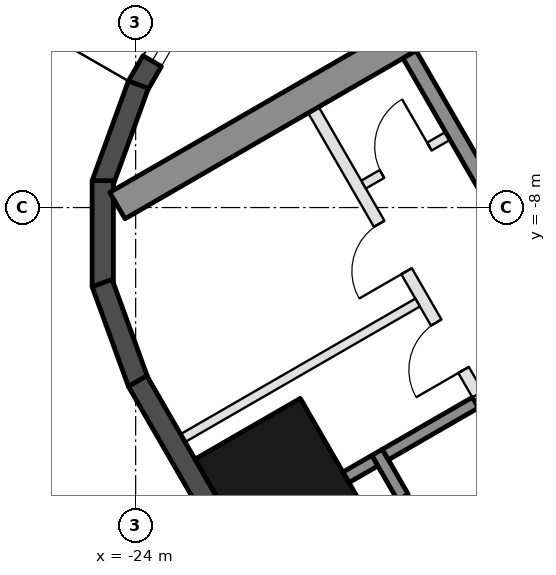
"""IFC4 building model, lengths in metres.
Left out: names, types, materials, properties, quantities, classifications, styles, units other than length and angle.
Written with IfcOpenShell. Run it as: python <this file> out.ifc"""

import sys

from ifc_helpers import new_model, si_unit, direction, frame, frame_2d, origin, origin_2d, place, context, subcontext, project, spatial, rectangle, hollow_rectangle, extrude, boolean, halfspace, element, fill, save


model = new_model("IFC4")
c1 = context("Model", 3, precision=1e-05, world=origin(), true_north=direction((0.0, 1.0)))
c2 = subcontext(c1, "Body", "Model", "MODEL_VIEW")
j1 = project(units=[si_unit("LENGTHUNIT", "METRE"), si_unit("PLANEANGLEUNIT", "RADIAN")], contexts=[c1])
p1 = place(None, origin())
s1 = spatial("IfcSite", under=j1, at=p1, CompositionType="ELEMENT")
p2 = place(p1, origin())
s2 = spatial("IfcBuilding", under=s1, at=p2, CompositionType="ELEMENT")
p3 = place(p2, frame((0.0, 0.0, 280.0)))
s3 = spatial("IfcBuildingStorey", under=s2, at=p3, CompositionType="ELEMENT", Elevation=280.0)
p4 = place(p3, frame((-21.658, -12.504, 0.0), z_axis=(0.0, 0.0, 1.0), x_axis=(-0.5, 0.866025403784, 0.0)))
e1 = element("IfcColumn", 1, at=p4, inside=s3, PredefinedType="COLUMN", context=c2, shape_type="SweptSolid", body=[
    boolean("DIFFERENCE", extrude(hollow_rectangle(XDim=2.0, YDim=2.0, WallThickness=0.05, at=origin_2d()), origin(), (0.0, 0.0, 1.0), 3.7), halfspace(frame((0.0, 0.0, 0.113), z_axis=(0.0, 0.0, 1.0), x_axis=(1.0, 0.0, 0.0)), True)),
])
p5 = place(p3, frame((-22.14, -2.841, 0.0), z_axis=(0.0, 0.0, 1.0), x_axis=(-0.500040506767, -0.866002015928, 0.0)))
e2 = element("IfcWall", 2, at=p5, inside=s3, PredefinedType="SOLIDWALL", context=c2, shape_type="SweptSolid", body=[
    extrude(rectangle(XDim=3.655, YDim=0.35, at=frame_2d((1.827, 0.0))), origin(), (0.0, 0.0, 1.0), 3.55),
])
p6 = place(p5, frame((1.575, 0.0, 0.3)))
e3 = element("IfcOpeningElement", 3, at=p6, cuts=e2, PredefinedType="OPENING", context=c2, shape_type="SweptSolid", body=[
    extrude(rectangle(XDim=1.6, YDim=2.65, at=frame_2d((0.8, 1.325))), frame((0.0, 0.185, 0.0), z_axis=(0.0, -1.0, 0.0), x_axis=(1.0, 0.0, 0.0)), (0.0, 0.0, 1.0), 0.37),
])
for number, where, z_axis, x_axis in (
    (4, (-23.955, -5.978, 0.0), (0.0, 0.0, 1.0), (-0.342, -0.94, 0.0)),
    (5, (-24.541, -7.558, 0.0), (0.0, 0.0, 1.0), (0.0, -1.0, 0.0)),
    (6, (-24.552, -9.242, 0.0), (0.0, 0.0, 1.0), (0.342, -0.94, 0.0)),
):
    element("IfcWall", number, at=place(p3, frame(where, z_axis=z_axis, x_axis=x_axis)), inside=s3, PredefinedType="SOLIDWALL", context=c2, shape_type="SweptSolid", body=[
        extrude(rectangle(XDim=1.745, YDim=0.35, at=frame_2d((0.872, 0.0))), origin(), (0.0, 0.0, 1.0), 3.55),
    ])
p7 = place(p3, frame((-23.968, -10.854, 0.0), z_axis=(0.0, 0.0, 1.0), x_axis=(0.500020983425, -0.866013288659, 0.0)))
e7 = element("IfcWall", 7, at=p7, inside=s3, PredefinedType="SOLIDWALL", context=c2, shape_type="SweptSolid", body=[
    extrude(rectangle(XDim=5.168, YDim=0.35, at=frame_2d((2.584, 0.0))), origin(), (0.0, 0.0, 1.0), 3.55),
])
for number, where, z_axis, x_axis in (
    (8, (-13.797, -1.903, 0.0), (0.0, 0.0, 1.0), (-0.866, -0.5, 0.0)),
    (9, (-8.547, -10.997, 0.0), (0.0, 0.0, 1.0), (-0.866, -0.5, 0.0)),
):
    element("IfcWall", number, at=place(p3, frame(where, z_axis=z_axis, x_axis=x_axis)), inside=s3, PredefinedType="SHEAR", context=c2, shape_type="SweptSolid", body=[
        extrude(rectangle(XDim=12.129, YDim=0.5, at=frame_2d((6.064, 0.0))), origin(), (0.0, 0.0, 1.0), 3.5),
    ])
p8 = place(p3, frame((-19.496, -5.482, 0.0), z_axis=(0.0, 0.0, 1.0), x_axis=(0.499990435942, -0.866030925526, 0.0)))
e10 = element("IfcWall", 10, at=p8, inside=s3, PredefinedType="SHEAR", context=c2, shape_type="SweptSolid", body=[
    extrude(rectangle(XDim=2.55, YDim=0.25, at=frame_2d((1.275, 0.0))), origin(), (0.0, 0.0, 1.0), 3.5),
])
p9 = place(p3, frame((-10.068, -9.162, 0.0), z_axis=(0.0, 0.0, 1.0), x_axis=(-0.866032725843, -0.499987317609, 0.0)))
e11 = element("IfcWall", 11, at=p9, inside=s3, PredefinedType="SHEAR", context=c2, shape_type="SweptSolid", body=[
    extrude(rectangle(XDim=10.16, YDim=0.2, at=frame_2d((5.08, 0.0))), origin(), (0.0, 0.0, 1.0), 3.5),
])
p10 = place(p9, frame((1.99, 0.0, 0.0)))
e12 = element("IfcOpeningElement", 12, at=p10, cuts=e11, PredefinedType="OPENING", context=c2, shape_type="SweptSolid", body=[
    extrude(rectangle(XDim=0.9, YDim=2.1, at=frame_2d((0.45, 1.05))), frame((0.0, 0.11, 0.0), z_axis=(0.0, -1.0, 0.0), x_axis=(1.0, 0.0, 0.0)), (0.0, 0.0, 1.0), 0.22),
])
p11 = place(p9, frame((7.07, 0.0, 0.0)))
e13 = element("IfcOpeningElement", 13, at=p11, cuts=e11, PredefinedType="OPENING", context=c2, shape_type="SweptSolid", body=[
    extrude(rectangle(XDim=0.9, YDim=2.1, at=frame_2d((0.45, 1.05))), frame((0.0, 0.11, 0.0), z_axis=(0.0, -1.0, 0.0), x_axis=(1.0, 0.0, 0.0)), (0.0, 0.0, 1.0), 0.22),
])
p12 = place(p3, frame((-20.031, -12.026, 0.0), z_axis=(0.0, 0.0, 1.0), x_axis=(0.500033551112, -0.866006032174, 0.0)))
e14 = element("IfcWall", 14, at=p12, inside=s3, PredefinedType="SHEAR", context=c2, shape_type="SweptSolid", body=[
    extrude(rectangle(XDim=2.4, YDim=0.2, at=frame_2d((1.2, 0.0))), origin(), (0.0, 0.0, 1.0), 3.5),
])
p13 = place(p12, frame((0.85, 0.0, 0.0)))
e15 = element("IfcOpeningElement", 15, at=p13, cuts=e14, PredefinedType="OPENING", context=c2, shape_type="SweptSolid", body=[
    extrude(rectangle(XDim=0.9, YDim=2.1, at=frame_2d((0.45, 1.05))), frame((0.0, 0.11, 0.0), z_axis=(0.0, -1.0, 0.0), x_axis=(1.0, 0.0, 0.0)), (0.0, 0.0, 1.0), 0.22),
])
p14 = place(p3, frame((-18.413, -11.208, 0.0), z_axis=(0.0, 0.0, 1.0), x_axis=(-0.866038183914, -0.499977863513, 0.0)))
e16 = element("IfcWall", 16, at=p14, inside=s3, PredefinedType="SHEAR", context=c2, shape_type="SweptSolid", body=[
    extrude(rectangle(XDim=1.71, YDim=0.2, at=frame_2d((0.855, 0.0))), origin(), (0.0, 0.0, 1.0), 3.5),
])
p15 = place(p3, frame((-20.067, -12.163, 0.0), z_axis=(0.0, 0.0, 1.0), x_axis=(-0.866044851585, -0.499966313909, 0.0)))
e17 = element("IfcWall", 17, at=p15, inside=s3, PredefinedType="SHEAR", context=c2, shape_type="SweptSolid", body=[
    extrude(rectangle(XDim=0.549, YDim=0.2, at=frame_2d((0.274, 0.0))), origin(), (0.0, 0.0, 1.0), 3.5),
])
p16 = place(p3, frame((-21.076, -6.395, 0.0), z_axis=(0.0, 0.0, 1.0), x_axis=(0.50001468107, -0.866016927499, 0.0)))
e18 = element("IfcWall", 18, at=p16, inside=s3, PredefinedType="PARTITIONING", context=c2, shape_type="SweptSolid", body=[
    extrude(rectangle(XDim=5.4, YDim=0.2, at=frame_2d((2.7, 0.0))), origin(), (0.0, 0.0, 1.0), 3.5),
])
p17 = place(p16, frame((2.163, 0.0, 0.0)))
e19 = element("IfcOpeningElement", 19, at=p17, cuts=e18, PredefinedType="OPENING", context=c2, shape_type="SweptSolid", body=[
    extrude(rectangle(XDim=0.9, YDim=2.1, at=frame_2d((0.45, 1.05))), frame((0.0, 0.11, 0.0), z_axis=(0.0, -1.0, 0.0), x_axis=(1.0, 0.0, 0.0)), (0.0, 0.0, 1.0), 0.22),
])
p18 = place(p16, frame((4.038, 0.0, 0.0)))
e20 = element("IfcOpeningElement", 20, at=p18, cuts=e18, PredefinedType="OPENING", context=c2, shape_type="SweptSolid", body=[
    extrude(rectangle(XDim=0.9, YDim=2.1, at=frame_2d((0.45, 1.05))), frame((0.0, 0.11, 0.0), z_axis=(0.0, -1.0, 0.0), x_axis=(1.0, 0.0, 0.0)), (0.0, 0.0, 1.0), 0.22),
])
p19 = place(p3, frame((-18.866, -6.822, 0.0), z_axis=(0.0, 0.0, 1.0), x_axis=(-0.866028054938, -0.499995408039, 0.0)))
e21 = element("IfcWall", 21, at=p19, inside=s3, PredefinedType="PARTITIONING", context=c2, shape_type="SweptSolid", body=[
    extrude(rectangle(XDim=1.6, YDim=0.15, at=frame_2d((0.8, 0.0))), origin(), (0.0, 0.0, 1.0), 3.5),
])
p20 = place(p19, frame((0.35, 0.0, 0.0)))
e22 = element("IfcOpeningElement", 22, at=p20, cuts=e21, PredefinedType="OPENING", context=c2, shape_type="SweptSolid", body=[
    extrude(rectangle(XDim=0.9, YDim=2.1, at=frame_2d((0.45, 1.05))), frame((0.0, 0.085, 0.0), z_axis=(0.0, -1.0, 0.0), x_axis=(1.0, 0.0, 0.0)), (0.0, 0.0, 1.0), 0.17),
])
p21 = place(p3, frame((-19.363, -9.562, 0.0), z_axis=(0.0, 0.0, 1.0), x_axis=(-0.866024199568, -0.500002085759, 0.0)))
e23 = element("IfcWall", 23, at=p21, inside=s3, PredefinedType="PARTITIONING", context=c2, shape_type="SweptSolid", body=[
    extrude(rectangle(XDim=4.459, YDim=0.15, at=frame_2d((2.229, 0.0))), origin(), (0.0, 0.0, 1.0), 3.5),
])
p22 = place(p6, origin())
e24 = element("IfcWindow", 24, at=p22, inside=s3, PartitioningType="SINGLE_PANEL", PredefinedType="WINDOW", context=c2, shape_type="SweptSolid", body=[
    extrude(rectangle(XDim=1.6, YDim=2.65, at=frame_2d((0.8, 1.325))), frame((0.0, 0.03, 0.0), z_axis=(0.0, -1.0, 0.0), x_axis=(1.0, 0.0, 0.0)), (0.0, 0.0, 1.0), 0.06),
])
fill(e3, e24)
p23 = place(p20, frame((0.9, 0.0, 0.0), z_axis=(0.0, 0.0, 1.0), x_axis=(-1.0, 0.0, 0.0)))
e25 = element("IfcDoor", 25, at=p23, inside=s3, OperationType="SINGLE_SWING_RIGHT", PredefinedType="DOOR", context=c2, shape_type="SweptSolid", body=[
    extrude(rectangle(XDim=0.9, YDim=2.1, at=frame_2d((0.45, 1.05))), frame((0.0, 0.025, 0.0), z_axis=(0.0, -1.0, 0.0), x_axis=(1.0, 0.0, 0.0)), (0.0, 0.0, 1.0), 0.05),
])
fill(e22, e25)
p24 = place(p17, frame((0.9, 0.0, 0.0), z_axis=(0.0, 0.0, 1.0), x_axis=(-1.0, 0.0, 0.0)))
e26 = element("IfcDoor", 26, at=p24, inside=s3, OperationType="SINGLE_SWING_LEFT", PredefinedType="DOOR", context=c2, shape_type="SweptSolid", body=[
    extrude(rectangle(XDim=0.9, YDim=2.1, at=frame_2d((0.45, 1.05))), frame((0.0, 0.025, 0.0), z_axis=(0.0, -1.0, 0.0), x_axis=(1.0, 0.0, 0.0)), (0.0, 0.0, 1.0), 0.05),
])
fill(e19, e26)
p25 = place(p18, frame((0.9, 0.0, 0.0), z_axis=(0.0, 0.0, 1.0), x_axis=(-1.0, 0.0, 0.0)))
e27 = element("IfcDoor", 27, at=p25, inside=s3, OperationType="SINGLE_SWING_LEFT", PredefinedType="DOOR", context=c2, shape_type="SweptSolid", body=[
    extrude(rectangle(XDim=0.9, YDim=2.1, at=frame_2d((0.45, 1.05))), frame((0.0, 0.025, 0.0), z_axis=(0.0, -1.0, 0.0), x_axis=(1.0, 0.0, 0.0)), (0.0, 0.0, 1.0), 0.05),
])
fill(e20, e27)
save(model, sys.argv[1])
